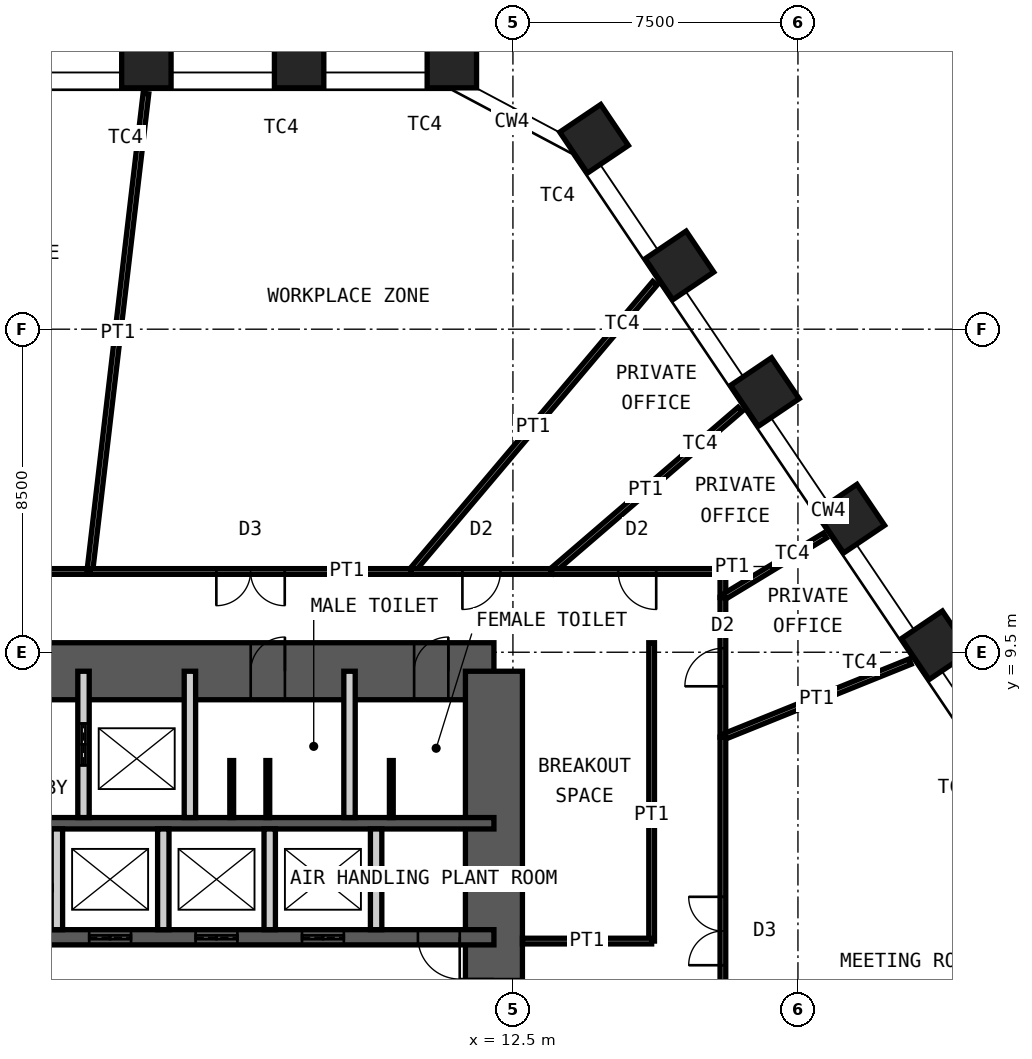
"""IFC4 building model, lengths in metres.
Left out: names, types, materials, properties, quantities, classifications, styles, units other than length and angle.
Written with IfcOpenShell. Run it as: python <this file> out.ifc"""

import sys

from ifc_helpers import new_model, si_unit, direction, frame, frame_2d, origin, origin_2d, place, context, subcontext, project, spatial, rectangle, hollow_rectangle, extrude, element, fill, save


model = new_model("IFC4")
c1 = context("Model", 3, precision=1e-05, world=origin(), true_north=direction((0.0, 1.0)))
c2 = subcontext(c1, "Body", "Model", "MODEL_VIEW")
j1 = project(units=[si_unit("LENGTHUNIT", "METRE"), si_unit("PLANEANGLEUNIT", "RADIAN")], contexts=[c1])
p1 = place(None, origin())
s1 = spatial("IfcSite", under=j1, at=p1, CompositionType="ELEMENT")
p2 = place(p1, origin())
s2 = spatial("IfcBuilding", under=s1, at=p2, CompositionType="ELEMENT")
p3 = place(p2, frame((0.0, 0.0, 149.2)))
s3 = spatial("IfcBuildingStorey", under=s2, at=p3, CompositionType="ELEMENT", Elevation=149.2)
for number, where, z_axis, x_axis in (
    (1, (2.854, 25.0, 0.0), (0.0, 0.0, 1.0), (-1.0, 0.0, 0.0)),
    (2, (6.874, 25.0, 0.0), (0.0, 0.0, 1.0), (-1.0, 0.0, 0.0)),
    (3, (10.893, 25.0, 0.0), (0.0, 0.0, 1.0), (-1.0, 0.0, 0.0)),
    (4, (14.635, 23.01, 0.0), (0.0, 0.0, 1.0), (-0.559, 0.829, 0.0)),
    (5, (16.882, 19.678, 0.0), (0.0, 0.0, 1.0), (-0.559, 0.829, 0.0)),
    (6, (19.13, 16.346, 0.0), (0.0, 0.0, 1.0), (-0.559, 0.829, 0.0)),
    (7, (21.377, 13.014, 0.0), (0.0, 0.0, 1.0), (-0.559, 0.829, 0.0)),
    (8, (23.625, 9.682, 0.0), (0.0, 0.0, 1.0), (-0.559, 0.829, 0.0)),
):
    element("IfcColumn", number, at=place(p3, frame(where, z_axis=z_axis, x_axis=x_axis)), inside=s3, PredefinedType="COLUMN", context=c2, shape_type="SweptSolid", body=[
        extrude(hollow_rectangle(XDim=1.3, YDim=1.3, WallThickness=0.1, at=origin_2d()), origin(), (0.0, 0.0, 1.0), 4.2),
    ])
p4 = place(p3, frame((-12.0, 9.0, 0.0), z_axis=(0.0, 0.0, 1.0), x_axis=(1.0, 0.0, 0.0)))
e9 = element("IfcWall", 9, at=p4, inside=s3, PredefinedType="SHEAR", context=c2, shape_type="SweptSolid", body=[
    extrude(rectangle(XDim=24.0, YDim=1.5, at=frame_2d((12.0, 0.0))), origin(), (0.0, 0.0, 1.0), 4.2),
])
p5 = place(p4, frame((10.4, 0.0, 0.0)))
e10 = element("IfcOpeningElement", 10, at=p5, cuts=e9, PredefinedType="OPENING", context=c2, shape_type="SweptSolid", body=[
    extrude(rectangle(XDim=1.0, YDim=2.1, at=frame_2d((0.5, 1.05))), frame((0.0, 0.76, 0.0), z_axis=(0.0, -1.0, 0.0), x_axis=(1.0, 0.0, 0.0)), (0.0, 0.0, 1.0), 1.52),
])
p6 = place(p4, frame((17.6, 0.0, 0.0)))
e11 = element("IfcOpeningElement", 11, at=p6, cuts=e9, PredefinedType="OPENING", context=c2, shape_type="SweptSolid", body=[
    extrude(rectangle(XDim=0.9, YDim=2.1, at=frame_2d((0.45, 1.05))), frame((0.0, 0.76, 0.0), z_axis=(0.0, -1.0, 0.0), x_axis=(1.0, 0.0, 0.0)), (0.0, 0.0, 1.0), 1.52),
])
p7 = place(p4, frame((21.9, 0.0, 0.0)))
e12 = element("IfcOpeningElement", 12, at=p7, cuts=e9, PredefinedType="OPENING", context=c2, shape_type="SweptSolid", body=[
    extrude(rectangle(XDim=0.9, YDim=2.1, at=frame_2d((0.45, 1.05))), frame((0.0, 0.76, 0.0), z_axis=(0.0, -1.0, 0.0), x_axis=(1.0, 0.0, 0.0)), (0.0, 0.0, 1.0), 1.52),
])
p8 = place(p3, frame((12.0, -9.0, 0.0), z_axis=(0.0, 0.0, 1.0), x_axis=(0.0, 1.0, 0.0)))
e13 = element("IfcWall", 13, at=p8, inside=s3, PredefinedType="SHEAR", context=c2, shape_type="SweptSolid", body=[
    extrude(rectangle(XDim=18.0, YDim=1.5, at=frame_2d((9.0, 0.0))), origin(), (0.0, 0.0, 1.0), 4.2),
])
p9 = place(p8, frame((8.1, 0.0, 0.0)))
e14 = element("IfcOpeningElement", 14, at=p9, cuts=e13, PredefinedType="OPENING", context=c2, shape_type="SweptSolid", body=[
    extrude(rectangle(XDim=1.8, YDim=2.1, at=frame_2d((0.9, 1.05))), frame((0.0, 0.76, 0.0), z_axis=(0.0, -1.0, 0.0), x_axis=(1.0, 0.0, 0.0)), (0.0, 0.0, 1.0), 1.52),
])
p10 = place(p3, frame((-12.0, 5.0, 0.0), z_axis=(0.0, 0.0, 1.0), x_axis=(1.0, 0.0, 0.0)))
e15 = element("IfcWall", 15, at=p10, inside=s3, PredefinedType="SHEAR", context=c2, shape_type="SweptSolid", body=[
    extrude(rectangle(XDim=24.0, YDim=0.3, at=frame_2d((12.0, 0.0))), origin(), (0.0, 0.0, 1.0), 4.2),
])
p11 = place(p3, frame((-12.0, 2.0, 0.0), z_axis=(0.0, 0.0, 1.0), x_axis=(1.0, 0.0, 0.0)))
e16 = element("IfcWall", 16, at=p11, inside=s3, PredefinedType="SHEAR", context=c2, shape_type="SweptSolid", body=[
    extrude(rectangle(XDim=24.0, YDim=0.4, at=frame_2d((12.0, 0.0))), origin(), (0.0, 0.0, 1.0), 4.2),
])
p12 = place(p11, frame((2.4, 0.0, 0.0)))
e17 = element("IfcOpeningElement", 17, at=p12, cuts=e16, PredefinedType="OPENING", context=c2, shape_type="SweptSolid", body=[
    extrude(rectangle(XDim=1.1, YDim=2.1, at=frame_2d((0.55, 1.05))), frame((0.0, 0.21, 0.0), z_axis=(0.0, -1.0, 0.0), x_axis=(1.0, 0.0, 0.0)), (0.0, 0.0, 1.0), 0.42),
])
p13 = place(p11, frame((22.0, 0.0, 0.0)))
e18 = element("IfcOpeningElement", 18, at=p13, cuts=e16, PredefinedType="OPENING", context=c2, shape_type="SweptSolid", body=[
    extrude(rectangle(XDim=1.1, YDim=2.1, at=frame_2d((0.55, 1.05))), frame((0.0, 0.21, 0.0), z_axis=(0.0, -1.0, 0.0), x_axis=(1.0, 0.0, 0.0)), (0.0, 0.0, 1.0), 0.42),
])
p14 = place(p11, frame((10.15, 0.0, 0.0)))
e19 = element("IfcOpeningElement", 19, at=p14, cuts=e16, PredefinedType="OPENING", context=c2, shape_type="SweptSolid", body=[
    extrude(rectangle(XDim=1.0, YDim=2.1, at=frame_2d((0.5, 1.05))), frame((0.0, 0.21, 0.0), z_axis=(0.0, -1.0, 0.0), x_axis=(1.0, 0.0, 0.0)), (0.0, 0.0, 1.0), 0.42),
])
p15 = place(p11, frame((6.9, 0.0, 0.0)))
e20 = element("IfcOpeningElement", 20, at=p15, cuts=e16, PredefinedType="OPENING", context=c2, shape_type="SweptSolid", body=[
    extrude(rectangle(XDim=1.0, YDim=2.1, at=frame_2d((0.5, 1.05))), frame((0.0, 0.21, 0.0), z_axis=(0.0, -1.0, 0.0), x_axis=(1.0, 0.0, 0.0)), (0.0, 0.0, 1.0), 0.42),
])
p16 = place(p11, frame((13.35, 0.0, 0.0)))
e21 = element("IfcOpeningElement", 21, at=p16, cuts=e16, PredefinedType="OPENING", context=c2, shape_type="SweptSolid", body=[
    extrude(rectangle(XDim=1.1, YDim=2.4, at=frame_2d((0.55, 1.2))), frame((0.0, 0.21, 0.0), z_axis=(0.0, -1.0, 0.0), x_axis=(1.0, 0.0, 0.0)), (0.0, 0.0, 1.0), 0.42),
])
p17 = place(p11, frame((16.15, 0.0, 0.0)))
e22 = element("IfcOpeningElement", 22, at=p17, cuts=e16, PredefinedType="OPENING", context=c2, shape_type="SweptSolid", body=[
    extrude(rectangle(XDim=1.1, YDim=2.4, at=frame_2d((0.55, 1.2))), frame((0.0, 0.21, 0.0), z_axis=(0.0, -1.0, 0.0), x_axis=(1.0, 0.0, 0.0)), (0.0, 0.0, 1.0), 0.42),
])
p18 = place(p11, frame((18.95, 0.0, 0.0)))
e23 = element("IfcOpeningElement", 23, at=p18, cuts=e16, PredefinedType="OPENING", context=c2, shape_type="SweptSolid", body=[
    extrude(rectangle(XDim=1.1, YDim=2.4, at=frame_2d((0.55, 1.2))), frame((0.0, 0.21, 0.0), z_axis=(0.0, -1.0, 0.0), x_axis=(1.0, 0.0, 0.0)), (0.0, 0.0, 1.0), 0.42),
])
p19 = place(p3, frame((1.2, 5.15, 0.0), z_axis=(0.0, 0.0, 1.0), x_axis=(0.0, 1.0, 0.0)))
e24 = element("IfcWall", 24, at=p19, inside=s3, PredefinedType="PARTITIONING", context=c2, shape_type="SweptSolid", body=[
    extrude(rectangle(XDim=3.85, YDim=0.3, at=frame_2d((1.925, 0.0))), origin(), (0.0, 0.0, 1.0), 3.98),
])
p20 = place(p19, frame((1.375, 0.0, 0.0)))
e25 = element("IfcOpeningElement", 25, at=p20, cuts=e24, PredefinedType="OPENING", context=c2, shape_type="SweptSolid", body=[
    extrude(rectangle(XDim=1.1, YDim=2.4, at=frame_2d((0.55, 1.2))), frame((0.0, 0.16, 0.0), z_axis=(0.0, -1.0, 0.0), x_axis=(1.0, 0.0, 0.0)), (0.0, 0.0, 1.0), 0.32),
])
for number, where, z_axis, x_axis in (
    (26, (4.0, 5.15, 0.0), (0.0, 0.0, 1.0), (0.0, 1.0, 0.0)),
    (27, (8.2, 5.15, 0.0), (0.0, 0.0, 1.0), (0.0, 1.0, 0.0)),
):
    element("IfcWall", number, at=place(p3, frame(where, z_axis=z_axis, x_axis=x_axis)), inside=s3, PredefinedType="PARTITIONING", context=c2, shape_type="SweptSolid", body=[
        extrude(rectangle(XDim=3.85, YDim=0.3, at=frame_2d((1.925, 0.0))), origin(), (0.0, 0.0, 1.0), 3.98),
    ])
for number, where, z_axis, x_axis in (
    (28, (0.5, 2.2, 0.0), (0.0, 0.0, 1.0), (0.0, 1.0, 0.0)),
    (29, (3.3, 2.2, 0.0), (0.0, 0.0, 1.0), (0.0, 1.0, 0.0)),
    (30, (6.1, 2.2, 0.0), (0.0, 0.0, 1.0), (0.0, 1.0, 0.0)),
    (31, (8.9, 2.2, 0.0), (0.0, 0.0, 1.0), (0.0, 1.0, 0.0)),
):
    element("IfcWall", number, at=place(p3, frame(where, z_axis=z_axis, x_axis=x_axis)), inside=s3, PredefinedType="PARTITIONING", context=c2, shape_type="SweptSolid", body=[
        extrude(rectangle(XDim=2.65, YDim=0.3, at=frame_2d((1.325, 0.0))), origin(), (0.0, 0.0, 1.0), 3.98),
    ])
for number, where, z_axis, x_axis in (
    (32, (5.1, 5.15, 0.0), (0.0, 0.0, 1.0), (0.0, 1.0, 0.0)),
    (33, (6.05, 5.15, 0.0), (0.0, 0.0, 1.0), (0.0, 1.0, 0.0)),
    (34, (9.3, 5.15, 0.0), (0.0, 0.0, 1.0), (0.0, 1.0, 0.0)),
):
    element("IfcWall", number, at=place(p3, frame(where, z_axis=z_axis, x_axis=x_axis)), inside=s3, PredefinedType="PARTITIONING", context=c2, shape_type="SweptSolid", body=[
        extrude(rectangle(XDim=1.5, YDim=0.1, at=frame_2d((0.75, 0.0))), origin(), (0.0, 0.0, 1.0), 2.1),
    ])
p21 = place(p3, frame((16.237, 19.21, 0.0), z_axis=(0.0, 0.0, 1.0), x_axis=(-0.645526723652, -0.763737683404, 0.0)))
e35 = element("IfcWall", 35, at=p21, inside=s3, PredefinedType="PARTITIONING", context=c2, shape_type="SweptSolid", body=[
    extrude(rectangle(XDim=9.932, YDim=0.15, at=frame_2d((4.966, 0.0))), origin(), (0.0, 0.0, 1.0), 3.33),
])
p22 = place(p3, frame((9.826, 11.625, 0.0), z_axis=(0.0, 0.0, 1.0), x_axis=(1.0, 0.0, 0.0)))
e36 = element("IfcWall", 36, at=p22, inside=s3, PredefinedType="PARTITIONING", context=c2, shape_type="SweptSolid", body=[
    extrude(rectangle(XDim=3.689, YDim=0.15, at=frame_2d((1.845, 0.0))), origin(), (0.0, 0.0, 1.0), 4.03),
])
p23 = place(p22, frame((1.345, 0.0, 0.0)))
e37 = element("IfcOpeningElement", 37, at=p23, cuts=e36, PredefinedType="OPENING", context=c2, shape_type="SweptSolid", body=[
    extrude(rectangle(XDim=1.0, YDim=2.4, at=frame_2d((0.5, 1.2))), frame((0.0, 0.085, 0.0), z_axis=(0.0, -1.0, 0.0), x_axis=(1.0, 0.0, 0.0)), (0.0, 0.0, 1.0), 0.17),
])
p24 = place(p3, frame((18.474, 15.89, 0.0), z_axis=(0.0, 0.0, 1.0), x_axis=(-0.758143486665, -0.65208776528, 0.0)))
e38 = element("IfcWall", 38, at=p24, inside=s3, PredefinedType="PARTITIONING", context=c2, shape_type="SweptSolid", body=[
    extrude(rectangle(XDim=6.54, YDim=0.15, at=frame_2d((3.27, 0.0))), origin(), (0.0, 0.0, 1.0), 3.33),
])
p25 = place(p3, frame((13.515, 11.625, 0.0), z_axis=(0.0, 0.0, 1.0), x_axis=(1.0, 0.0, 0.0)))
e39 = element("IfcWall", 39, at=p25, inside=s3, PredefinedType="PARTITIONING", context=c2, shape_type="SweptSolid", body=[
    extrude(rectangle(XDim=4.51, YDim=0.15, at=frame_2d((2.255, 0.0))), origin(), (0.0, 0.0, 1.0), 4.03),
])
p26 = place(p25, frame((1.755, 0.0, 0.0)))
e40 = element("IfcOpeningElement", 40, at=p26, cuts=e39, PredefinedType="OPENING", context=c2, shape_type="SweptSolid", body=[
    extrude(rectangle(XDim=1.0, YDim=2.4, at=frame_2d((0.5, 1.2))), frame((0.0, 0.085, 0.0), z_axis=(0.0, -1.0, 0.0), x_axis=(1.0, 0.0, 0.0)), (0.0, 0.0, 1.0), 0.17),
])
p27 = place(p3, frame((18.025, 11.625, 0.0), z_axis=(0.0, 0.0, 1.0), x_axis=(0.0, -1.0, 0.0)))
e41 = element("IfcWall", 41, at=p27, inside=s3, PredefinedType="PARTITIONING", context=c2, shape_type="SweptSolid", body=[
    extrude(rectangle(XDim=0.684, YDim=0.15, at=frame_2d((0.342, 0.0))), origin(), (0.0, 0.0, 1.0), 4.03),
])
p28 = place(p3, frame((20.711, 12.571, 0.0), z_axis=(0.0, 0.0, 1.0), x_axis=(-0.854890890653, -0.518807830587, 0.0)))
e42 = element("IfcWall", 42, at=p28, inside=s3, PredefinedType="PARTITIONING", context=c2, shape_type="SweptSolid", body=[
    extrude(rectangle(XDim=3.143, YDim=0.15, at=frame_2d((1.571, 0.0))), origin(), (0.0, 0.0, 1.0), 3.33),
])
p29 = place(p3, frame((18.025, 10.941, 0.0), z_axis=(0.0, 0.0, 1.0), x_axis=(0.0, -1.0, 0.0)))
e43 = element("IfcWall", 43, at=p29, inside=s3, PredefinedType="PARTITIONING", context=c2, shape_type="SweptSolid", body=[
    extrude(rectangle(XDim=3.673, YDim=0.15, at=frame_2d((1.837, 0.0))), origin(), (0.0, 0.0, 1.0), 4.03),
])
p30 = place(p29, frame((1.337, 0.0, 0.0)))
e44 = element("IfcOpeningElement", 44, at=p30, cuts=e43, PredefinedType="OPENING", context=c2, shape_type="SweptSolid", body=[
    extrude(rectangle(XDim=1.0, YDim=2.4, at=frame_2d((0.5, 1.2))), frame((0.0, 0.085, 0.0), z_axis=(0.0, -1.0, 0.0), x_axis=(1.0, 0.0, 0.0)), (0.0, 0.0, 1.0), 0.17),
])
p31 = place(p3, frame((22.951, 9.254, 0.0), z_axis=(0.0, 0.0, 1.0), x_axis=(-0.927452527427, -0.37394091695, 0.0)))
e45 = element("IfcWall", 45, at=p31, inside=s3, PredefinedType="PARTITIONING", context=c2, shape_type="SweptSolid", body=[
    extrude(rectangle(XDim=5.312, YDim=0.15, at=frame_2d((2.656, 0.0))), origin(), (0.0, 0.0, 1.0), 3.33),
])
p32 = place(p3, frame((18.025, 7.267, 0.0), z_axis=(0.0, 0.0, 1.0), x_axis=(0.0, -1.0, 0.0)))
e46 = element("IfcWall", 46, at=p32, inside=s3, PredefinedType="PARTITIONING", context=c2, shape_type="SweptSolid", body=[
    extrude(rectangle(XDim=10.205, YDim=0.15, at=frame_2d((5.103, 0.0))), origin(), (0.0, 0.0, 1.0), 4.03),
])
p33 = place(p32, frame((4.203, 0.0, 0.0)))
e47 = element("IfcOpeningElement", 47, at=p33, cuts=e46, PredefinedType="OPENING", context=c2, shape_type="SweptSolid", body=[
    extrude(rectangle(XDim=1.8, YDim=2.4, at=frame_2d((0.9, 1.2))), frame((0.0, 0.085, 0.0), z_axis=(0.0, -1.0, 0.0), x_axis=(1.0, 0.0, 0.0)), (0.0, 0.0, 1.0), 0.17),
])
p34 = place(p3, frame((-4.403, 11.625, 0.0), z_axis=(0.0, 0.0, 1.0), x_axis=(1.0, 0.0, 0.0)))
e48 = element("IfcWall", 48, at=p34, inside=s3, PredefinedType="PARTITIONING", context=c2, shape_type="SweptSolid", body=[
    extrude(rectangle(XDim=5.768, YDim=0.15, at=frame_2d((2.884, 0.0))), origin(), (0.0, 0.0, 1.0), 4.03),
])
p35 = place(p34, frame((1.984, 0.0, 0.0)))
e49 = element("IfcOpeningElement", 49, at=p35, cuts=e48, PredefinedType="OPENING", context=c2, shape_type="SweptSolid", body=[
    extrude(rectangle(XDim=1.8, YDim=2.4, at=frame_2d((0.9, 1.2))), frame((0.0, 0.085, 0.0), z_axis=(0.0, -1.0, 0.0), x_axis=(1.0, 0.0, 0.0)), (0.0, 0.0, 1.0), 0.17),
])
p36 = place(p3, frame((2.843, 24.201, 0.0), z_axis=(0.0, 0.0, 1.0), x_axis=(-0.116670084723, -0.993170726175, 0.0)))
e50 = element("IfcWall", 50, at=p36, inside=s3, PredefinedType="PARTITIONING", context=c2, shape_type="SweptSolid", body=[
    extrude(rectangle(XDim=12.662, YDim=0.15, at=frame_2d((6.331, 0.0))), origin(), (0.0, 0.0, 1.0), 3.33),
])
p37 = place(p3, frame((1.366, 11.625, 0.0), z_axis=(0.0, 0.0, 1.0), x_axis=(1.0, 0.0, 0.0)))
e51 = element("IfcWall", 51, at=p37, inside=s3, PredefinedType="PARTITIONING", context=c2, shape_type="SweptSolid", body=[
    extrude(rectangle(XDim=8.46, YDim=0.15, at=frame_2d((4.23, 0.0))), origin(), (0.0, 0.0, 1.0), 4.03),
])
p38 = place(p37, frame((3.33, 0.0, 0.0)))
e52 = element("IfcOpeningElement", 52, at=p38, cuts=e51, PredefinedType="OPENING", context=c2, shape_type="SweptSolid", body=[
    extrude(rectangle(XDim=1.8, YDim=2.4, at=frame_2d((0.9, 1.2))), frame((0.0, 0.085, 0.0), z_axis=(0.0, -1.0, 0.0), x_axis=(1.0, 0.0, 0.0)), (0.0, 0.0, 1.0), 0.17),
])
p39 = place(p3, frame((16.15, 1.9, 0.0), z_axis=(0.0, 0.0, 1.0), x_axis=(0.0, 1.0, 0.0)))
e53 = element("IfcWall", 53, at=p39, inside=s3, PredefinedType="PARTITIONING", context=c2, shape_type="SweptSolid", body=[
    extrude(rectangle(XDim=7.85, YDim=0.15, at=frame_2d((3.925, 0.0))), origin(), (0.0, 0.0, 1.0), 4.03),
])
p40 = place(p3, frame((12.75, 1.9, 0.0), z_axis=(0.0, 0.0, 1.0), x_axis=(1.0, 0.0, 0.0)))
e54 = element("IfcWall", 54, at=p40, inside=s3, PredefinedType="PARTITIONING", context=c2, shape_type="SweptSolid", body=[
    extrude(rectangle(XDim=3.4, YDim=0.15, at=frame_2d((1.7, 0.0))), origin(), (0.0, 0.0, 1.0), 2.93),
])
p41 = place(p6, origin())
e55 = element("IfcDoor", 55, at=p41, inside=s3, OperationType="SINGLE_SWING_LEFT", PredefinedType="DOOR", context=c2, shape_type="SweptSolid", body=[
    extrude(rectangle(XDim=0.9, YDim=2.1, at=frame_2d((0.45, 1.05))), frame((0.0, 0.025, 0.0), z_axis=(0.0, -1.0, 0.0), x_axis=(1.0, 0.0, 0.0)), (0.0, 0.0, 1.0), 0.05),
])
fill(e11, e55)
p42 = place(p7, origin())
e56 = element("IfcDoor", 56, at=p42, inside=s3, OperationType="SINGLE_SWING_LEFT", PredefinedType="DOOR", context=c2, shape_type="SweptSolid", body=[
    extrude(rectangle(XDim=0.9, YDim=2.1, at=frame_2d((0.45, 1.05))), frame((0.0, 0.025, 0.0), z_axis=(0.0, -1.0, 0.0), x_axis=(1.0, 0.0, 0.0)), (0.0, 0.0, 1.0), 0.05),
])
fill(e12, e56)
p43 = place(p13, origin())
e57 = element("IfcDoor", 57, at=p43, inside=s3, OperationType="SINGLE_SWING_RIGHT", PredefinedType="DOOR", context=c2, shape_type="SweptSolid", body=[
    extrude(rectangle(XDim=1.1, YDim=2.1, at=frame_2d((0.55, 1.05))), frame((0.0, 0.025, 0.0), z_axis=(0.0, -1.0, 0.0), x_axis=(1.0, 0.0, 0.0)), (0.0, 0.0, 1.0), 0.05),
])
fill(e18, e57)
p44 = place(p9, origin())
e58 = element("IfcDoor", 58, at=p44, inside=s3, OperationType="DOUBLE_DOOR_DOUBLE_SWING", PredefinedType="DOOR", context=c2, shape_type="SweptSolid", body=[
    extrude(rectangle(XDim=1.8, YDim=2.1, at=frame_2d((0.9, 1.05))), frame((0.0, 0.025, 0.0), z_axis=(0.0, -1.0, 0.0), x_axis=(1.0, 0.0, 0.0)), (0.0, 0.0, 1.0), 0.05),
])
fill(e14, e58)
p45 = place(p20, origin())
e59 = element("IfcDoor", 59, at=p45, inside=s3, OperationType="DOUBLE_DOOR_SLIDING", PredefinedType="DOOR", context=c2, shape_type="SweptSolid", body=[
    extrude(rectangle(XDim=1.1, YDim=2.4, at=frame_2d((0.55, 1.2))), frame((0.0, 0.025, 0.0), z_axis=(0.0, -1.0, 0.0), x_axis=(1.0, 0.0, 0.0)), (0.0, 0.0, 1.0), 0.05),
])
fill(e25, e59)
p46 = place(p16, origin())
e60 = element("IfcDoor", 60, at=p46, inside=s3, OperationType="DOUBLE_DOOR_SLIDING", PredefinedType="DOOR", context=c2, shape_type="SweptSolid", body=[
    extrude(rectangle(XDim=1.1, YDim=2.4, at=frame_2d((0.55, 1.2))), frame((0.0, 0.025, 0.0), z_axis=(0.0, -1.0, 0.0), x_axis=(1.0, 0.0, 0.0)), (0.0, 0.0, 1.0), 0.05),
])
fill(e21, e60)
p47 = place(p17, origin())
e61 = element("IfcDoor", 61, at=p47, inside=s3, OperationType="DOUBLE_DOOR_SLIDING", PredefinedType="DOOR", context=c2, shape_type="SweptSolid", body=[
    extrude(rectangle(XDim=1.1, YDim=2.4, at=frame_2d((0.55, 1.2))), frame((0.0, 0.025, 0.0), z_axis=(0.0, -1.0, 0.0), x_axis=(1.0, 0.0, 0.0)), (0.0, 0.0, 1.0), 0.05),
])
fill(e22, e61)
p48 = place(p18, origin())
e62 = element("IfcDoor", 62, at=p48, inside=s3, OperationType="DOUBLE_DOOR_SLIDING", PredefinedType="DOOR", context=c2, shape_type="SweptSolid", body=[
    extrude(rectangle(XDim=1.1, YDim=2.4, at=frame_2d((0.55, 1.2))), frame((0.0, 0.025, 0.0), z_axis=(0.0, -1.0, 0.0), x_axis=(1.0, 0.0, 0.0)), (0.0, 0.0, 1.0), 0.05),
])
fill(e23, e62)
p49 = place(p23, origin())
e63 = element("IfcDoor", 63, at=p49, inside=s3, OperationType="SINGLE_SWING_LEFT", PredefinedType="DOOR", context=c2, shape_type="SweptSolid", body=[
    extrude(rectangle(XDim=1.0, YDim=2.4, at=frame_2d((0.5, 1.2))), frame((0.0, 0.025, 0.0), z_axis=(0.0, -1.0, 0.0), x_axis=(1.0, 0.0, 0.0)), (0.0, 0.0, 1.0), 0.05),
])
fill(e37, e63)
p50 = place(p26, origin())
e64 = element("IfcDoor", 64, at=p50, inside=s3, OperationType="SINGLE_SWING_RIGHT", PredefinedType="DOOR", context=c2, shape_type="SweptSolid", body=[
    extrude(rectangle(XDim=1.0, YDim=2.4, at=frame_2d((0.5, 1.2))), frame((0.0, 0.025, 0.0), z_axis=(0.0, -1.0, 0.0), x_axis=(1.0, 0.0, 0.0)), (0.0, 0.0, 1.0), 0.05),
])
fill(e40, e64)
p51 = place(p30, origin())
e65 = element("IfcDoor", 65, at=p51, inside=s3, OperationType="SINGLE_SWING_RIGHT", PredefinedType="DOOR", context=c2, shape_type="SweptSolid", body=[
    extrude(rectangle(XDim=1.0, YDim=2.4, at=frame_2d((0.5, 1.2))), frame((0.0, 0.025, 0.0), z_axis=(0.0, -1.0, 0.0), x_axis=(1.0, 0.0, 0.0)), (0.0, 0.0, 1.0), 0.05),
])
fill(e44, e65)
p52 = place(p33, origin())
e66 = element("IfcDoor", 66, at=p52, inside=s3, OperationType="DOUBLE_DOOR_DOUBLE_SWING", PredefinedType="DOOR", context=c2, shape_type="SweptSolid", body=[
    extrude(rectangle(XDim=1.8, YDim=2.4, at=frame_2d((0.9, 1.2))), frame((0.0, 0.025, 0.0), z_axis=(0.0, -1.0, 0.0), x_axis=(1.0, 0.0, 0.0)), (0.0, 0.0, 1.0), 0.05),
])
fill(e47, e66)
p53 = place(p38, origin())
e67 = element("IfcDoor", 67, at=p53, inside=s3, OperationType="DOUBLE_DOOR_DOUBLE_SWING", PredefinedType="DOOR", context=c2, shape_type="SweptSolid", body=[
    extrude(rectangle(XDim=1.8, YDim=2.4, at=frame_2d((0.9, 1.2))), frame((0.0, 0.025, 0.0), z_axis=(0.0, -1.0, 0.0), x_axis=(1.0, 0.0, 0.0)), (0.0, 0.0, 1.0), 0.05),
])
fill(e52, e67)
save(model, sys.argv[1])
